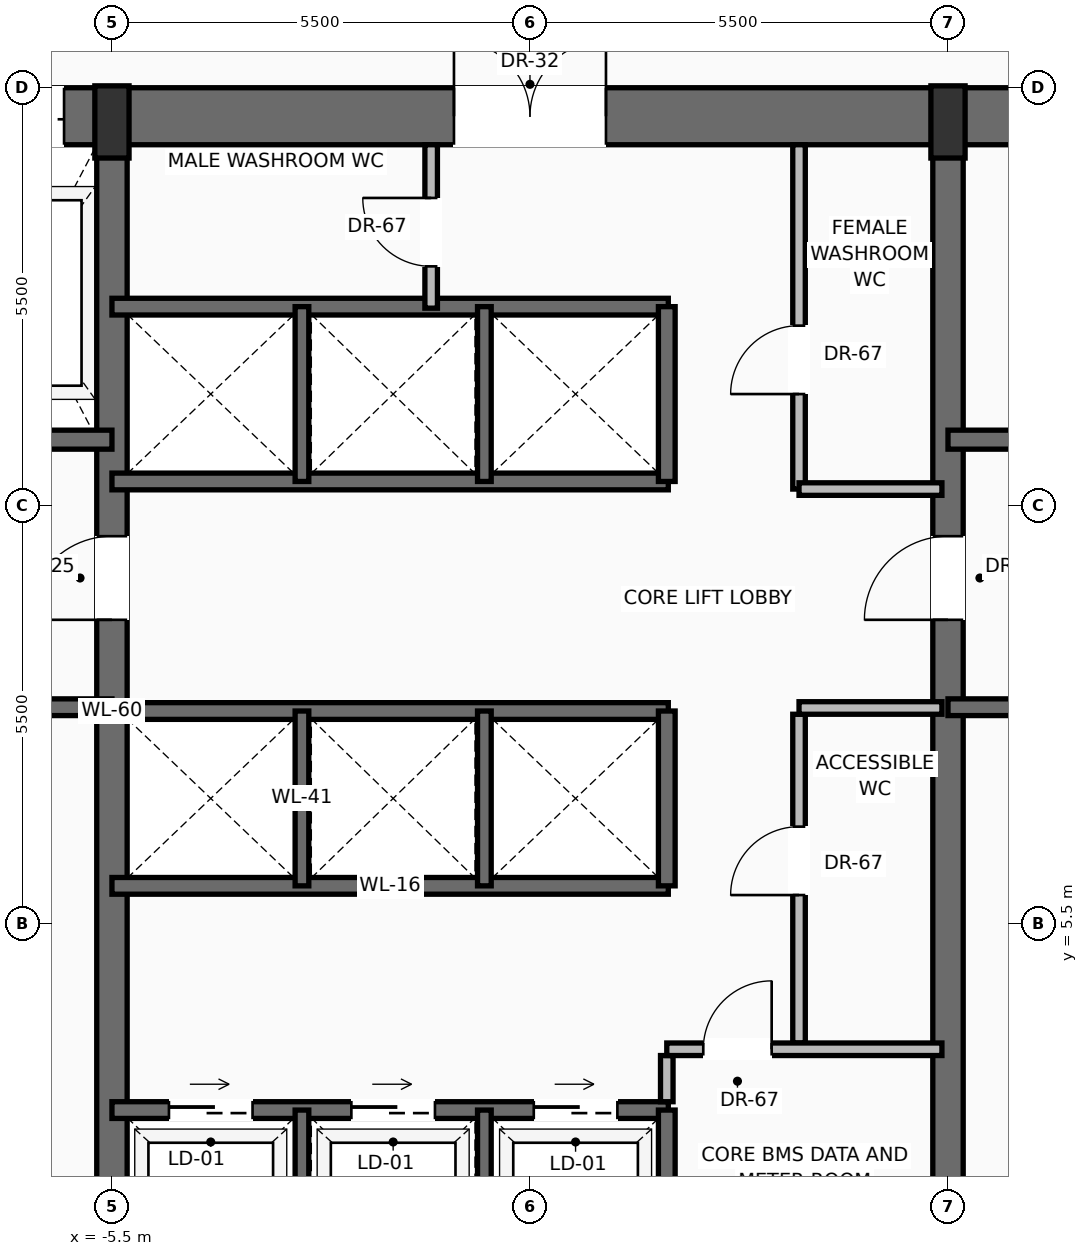
"""IFC4 building model, lengths in metres.
Left out: names, types, materials, properties, quantities, classifications, styles, units other than length and angle.
Written with IfcOpenShell. Run it as: python <this file> out.ifc"""

import sys

from ifc_helpers import new_model, si_unit, direction, frame, frame_2d, origin, origin_2d, place, context, subcontext, project, spatial, rectangle, extrude, source, transform, mapped, element, fill, save


model = new_model("IFC4")
c1 = context("Model", 3, precision=1e-05, world=origin(), true_north=direction((0.0, 1.0)))
c2 = subcontext(c1, "Body", "Model", "MODEL_VIEW")
j1 = project(units=[si_unit("LENGTHUNIT", "METRE"), si_unit("PLANEANGLEUNIT", "RADIAN")], contexts=[c1])
p1 = place(None, origin())
s1 = spatial("IfcSite", under=j1, at=p1, CompositionType="ELEMENT")
p2 = place(p1, origin())
s2 = spatial("IfcBuilding", under=s1, at=p2, CompositionType="ELEMENT")
p3 = place(p2, frame((0.0, 0.0, 117.3)))
s3 = spatial("IfcBuildingStorey", under=s2, at=p3, CompositionType="ELEMENT", Elevation=117.3)
p4 = place(p3, frame((-10.9, 16.125, 0.0), z_axis=(0.0, 0.0, 1.0), x_axis=(1.0, 0.0, 0.0)))
e1 = element("IfcWall", 1, at=p4, inside=s3, PredefinedType="SHEAR", context=c2, shape_type="SweptSolid", body=[
    extrude(rectangle(XDim=21.8, YDim=0.75, at=frame_2d((10.9, 0.0))), origin(), (0.0, 0.0, 1.0), 3.42),
])
p5 = place(p4, frame((3.47, 0.0, 0.0)))
e2 = element("IfcOpeningElement", 2, at=p5, cuts=e1, PredefinedType="OPENING", context=c2, shape_type="SweptSolid", body=[
    extrude(rectangle(XDim=1.3, YDim=2.3, at=frame_2d((0.65, 1.15))), frame((0.0, 0.385, 0.0), z_axis=(0.0, -1.0, 0.0), x_axis=(1.0, 0.0, 0.0)), (0.0, 0.0, 1.0), 0.77),
])
p6 = place(p4, frame((9.9, 0.0, 0.0)))
e3 = element("IfcOpeningElement", 3, at=p6, cuts=e1, PredefinedType="OPENING", context=c2, shape_type="SweptSolid", body=[
    extrude(rectangle(XDim=2.0, YDim=2.4, at=frame_2d((1.0, 1.2))), frame((0.0, 0.385, 0.0), z_axis=(0.0, -1.0, 0.0), x_axis=(1.0, 0.0, 0.0)), (0.0, 0.0, 1.0), 0.77),
])
p7 = place(p3, frame((-5.5, 0.475, 0.0), z_axis=(0.0, 0.0, 1.0), x_axis=(0.0, 1.0, 0.0)))
e4 = element("IfcWall", 4, at=p7, inside=s3, PredefinedType="SHEAR", context=c2, shape_type="SweptSolid", body=[
    extrude(rectangle(XDim=15.65, YDim=0.4, at=frame_2d((7.825, 0.0))), origin(), (0.0, 0.0, 1.0), 3.42),
])
p8 = place(p7, frame((9.025, 0.0, 0.0)))
e5 = element("IfcOpeningElement", 5, at=p8, cuts=e4, PredefinedType="OPENING", context=c2, shape_type="SweptSolid", body=[
    extrude(rectangle(XDim=1.1, YDim=2.2, at=frame_2d((0.55, 1.1))), frame((0.0, 0.21, 0.0), z_axis=(0.0, -1.0, 0.0), x_axis=(1.0, 0.0, 0.0)), (0.0, 0.0, 1.0), 0.42),
])
p9 = place(p3, frame((5.5, 0.475, 0.0), z_axis=(0.0, 0.0, 1.0), x_axis=(0.0, 1.0, 0.0)))
e6 = element("IfcWall", 6, at=p9, inside=s3, PredefinedType="SHEAR", context=c2, shape_type="SweptSolid", body=[
    extrude(rectangle(XDim=15.65, YDim=0.4, at=frame_2d((7.825, 0.0))), origin(), (0.0, 0.0, 1.0), 3.42),
])
p10 = place(p9, frame((9.025, 0.0, 0.0)))
e7 = element("IfcOpeningElement", 7, at=p10, cuts=e6, PredefinedType="OPENING", context=c2, shape_type="SweptSolid", body=[
    extrude(rectangle(XDim=1.1, YDim=2.2, at=frame_2d((0.55, 1.1))), frame((0.0, 0.21, 0.0), z_axis=(0.0, -1.0, 0.0), x_axis=(1.0, 0.0, 0.0)), (0.0, 0.0, 1.0), 0.42),
])
m1 = source(origin(), c2, "Body", "SweptSolid", [
    extrude(rectangle(XDim=0.45, YDim=0.95, at=origin_2d()), origin(), (0.0, 0.0, 1.0), 3.7),
])
for number, where, z_axis, x_axis in (
    (8, (-5.5, 16.05, 0.0), (0.0, 0.0, 1.0), (1.0, 0.0, 0.0)),
    (9, (5.5, 16.05, 0.0), (0.0, 0.0, 1.0), (1.0, 0.0, 0.0)),
):
    element("IfcColumn", number, at=place(p3, frame(where, z_axis=z_axis, x_axis=x_axis)), inside=s3, PredefinedType="PILASTER", context=c2, shape_type="MappedRepresentation", body=[
        mapped(m1, transform((0.0, 0.0, 0.0), scale=1.0)),
    ])
p11 = place(p3, frame((-5.5, 8.35, 0.0), z_axis=(0.0, 0.0, 1.0), x_axis=(-1.0, 0.0, 0.0)))
e10 = element("IfcWall", 10, at=p11, inside=s3, PredefinedType="SOLIDWALL", context=c2, shape_type="SweptSolid", body=[
    extrude(rectangle(XDim=4.65, YDim=0.22, at=frame_2d((2.325, 0.0))), origin(), (0.0, 0.0, 1.0), 3.42),
])
p12 = place(p11, frame((2.5, 0.0, 0.0)))
e11 = element("IfcOpeningElement", 11, at=p12, cuts=e10, PredefinedType="OPENING", context=c2, shape_type="SweptSolid", body=[
    extrude(rectangle(XDim=1.15, YDim=2.2, at=frame_2d((0.575, 1.1))), frame((0.0, 0.12, 0.0), z_axis=(0.0, -1.0, 0.0), x_axis=(1.0, 0.0, 0.0)), (0.0, 0.0, 1.0), 0.24),
])
p13 = place(p3, frame((-5.5, 11.87, 0.0), z_axis=(0.0, 0.0, 1.0), x_axis=(-1.0, 0.0, 0.0)))
e12 = element("IfcWall", 12, at=p13, inside=s3, PredefinedType="SOLIDWALL", context=c2, shape_type="SweptSolid", body=[
    extrude(rectangle(XDim=4.65, YDim=0.25, at=frame_2d((2.325, 0.0))), origin(), (0.0, 0.0, 1.0), 3.42),
])
p14 = place(p13, frame((2.95, 0.0, 0.0)))
e13 = element("IfcOpeningElement", 13, at=p14, cuts=e12, PredefinedType="OPENING", context=c2, shape_type="SweptSolid", body=[
    extrude(rectangle(XDim=1.2, YDim=2.25, at=frame_2d((0.6, 1.125))), frame((0.0, 0.135, 0.0), z_axis=(0.0, -1.0, 0.0), x_axis=(1.0, 0.0, 0.0)), (0.0, 0.0, 1.0), 0.27),
])
p15 = place(p3, frame((10.15, 8.35, 0.0), z_axis=(0.0, 0.0, 1.0), x_axis=(-1.0, 0.0, 0.0)))
e14 = element("IfcWall", 14, at=p15, inside=s3, PredefinedType="SOLIDWALL", context=c2, shape_type="SweptSolid", body=[
    extrude(rectangle(XDim=4.65, YDim=0.22, at=frame_2d((2.325, 0.0))), origin(), (0.0, 0.0, 1.0), 3.42),
])
p16 = place(p15, frame((1.0, 0.0, 0.0)))
e15 = element("IfcOpeningElement", 15, at=p16, cuts=e14, PredefinedType="OPENING", context=c2, shape_type="SweptSolid", body=[
    extrude(rectangle(XDim=1.15, YDim=2.2, at=frame_2d((0.575, 1.1))), frame((0.0, 0.12, 0.0), z_axis=(0.0, -1.0, 0.0), x_axis=(1.0, 0.0, 0.0)), (0.0, 0.0, 1.0), 0.24),
])
p17 = place(p3, frame((10.15, 11.87, 0.0), z_axis=(0.0, 0.0, 1.0), x_axis=(-1.0, 0.0, 0.0)))
e16 = element("IfcWall", 16, at=p17, inside=s3, PredefinedType="SOLIDWALL", context=c2, shape_type="SweptSolid", body=[
    extrude(rectangle(XDim=4.65, YDim=0.25, at=frame_2d((2.325, 0.0))), origin(), (0.0, 0.0, 1.0), 3.42),
])
p18 = place(p17, frame((0.5, 0.0, 0.0)))
e17 = element("IfcOpeningElement", 17, at=p18, cuts=e16, PredefinedType="OPENING", context=c2, shape_type="SweptSolid", body=[
    extrude(rectangle(XDim=1.2, YDim=2.25, at=frame_2d((0.6, 1.125))), frame((0.0, 0.135, 0.0), z_axis=(0.0, -1.0, 0.0), x_axis=(1.0, 0.0, 0.0)), (0.0, 0.0, 1.0), 0.27),
])
p19 = place(p3, frame((-5.5, 3.05, 0.0), z_axis=(0.0, 0.0, 1.0), x_axis=(1.0, 0.0, 0.0)))
e18 = element("IfcWall", 18, at=p19, inside=s3, PredefinedType="SOLIDWALL", context=c2, shape_type="SweptSolid", body=[
    extrude(rectangle(XDim=7.32, YDim=0.22, at=frame_2d((3.66, 0.0))), origin(), (0.0, 0.0, 1.0), 3.42),
])
p20 = place(p19, frame((0.75, 0.0, 0.0)))
e19 = element("IfcOpeningElement", 19, at=p20, cuts=e18, PredefinedType="OPENING", context=c2, shape_type="SweptSolid", body=[
    extrude(rectangle(XDim=1.1, YDim=2.2, at=frame_2d((0.55, 1.1))), frame((0.0, 0.12, 0.0), z_axis=(0.0, -1.0, 0.0), x_axis=(1.0, 0.0, 0.0)), (0.0, 0.0, 1.0), 0.24),
])
p21 = place(p19, frame((3.15, 0.0, 0.0)))
e20 = element("IfcOpeningElement", 20, at=p21, cuts=e18, PredefinedType="OPENING", context=c2, shape_type="SweptSolid", body=[
    extrude(rectangle(XDim=1.1, YDim=2.2, at=frame_2d((0.55, 1.1))), frame((0.0, 0.12, 0.0), z_axis=(0.0, -1.0, 0.0), x_axis=(1.0, 0.0, 0.0)), (0.0, 0.0, 1.0), 0.24),
])
p22 = place(p19, frame((5.55, 0.0, 0.0)))
e21 = element("IfcOpeningElement", 21, at=p22, cuts=e18, PredefinedType="OPENING", context=c2, shape_type="SweptSolid", body=[
    extrude(rectangle(XDim=1.1, YDim=2.2, at=frame_2d((0.55, 1.1))), frame((0.0, 0.12, 0.0), z_axis=(0.0, -1.0, 0.0), x_axis=(1.0, 0.0, 0.0)), (0.0, 0.0, 1.0), 0.24),
])
p23 = place(p3, frame((1.8, 0.85, 0.0), z_axis=(0.0, 0.0, 1.0), x_axis=(0.0, 1.0, 0.0)))
e22 = element("IfcWall", 22, at=p23, inside=s3, PredefinedType="SOLIDWALL", context=c2, shape_type="SweptSolid", body=[
    extrude(rectangle(XDim=2.2, YDim=0.22, at=frame_2d((1.1, 0.0))), origin(), (0.0, 0.0, 1.0), 3.42),
])
for number, where, z_axis, x_axis in (
    (23, (-3.0, 0.85, 0.0), (0.0, 0.0, 1.0), (0.0, 1.0, 0.0)),
    (24, (-0.6, 0.85, 0.0), (0.0, 0.0, 1.0), (0.0, 1.0, 0.0)),
):
    element("IfcWall", number, at=place(p3, frame(where, z_axis=z_axis, x_axis=x_axis)), inside=s3, PredefinedType="SOLIDWALL", context=c2, shape_type="SweptSolid", body=[
        extrude(rectangle(XDim=2.2, YDim=0.18, at=frame_2d((1.1, 0.0))), origin(), (0.0, 0.0, 1.0), 3.42),
    ])
p24 = place(p3, frame((1.8, 3.16, 0.0), z_axis=(0.0, 0.0, 1.0), x_axis=(0.0, 1.0, 0.0)))
e25 = element("IfcWall", 25, at=p24, inside=s3, PredefinedType="PARTITIONING", context=c2, shape_type="SweptSolid", body=[
    extrude(rectangle(XDim=0.608, YDim=0.165, at=frame_2d((0.304, 0.0))), origin(), (0.0, 0.0, 1.0), 3.412),
])
p25 = place(p3, frame((3.54, 3.933, 0.0), z_axis=(0.0, 0.0, 1.0), x_axis=(0.0, 1.0, 0.0)))
e26 = element("IfcWall", 26, at=p25, inside=s3, PredefinedType="PARTITIONING", context=c2, shape_type="SweptSolid", body=[
    extrude(rectangle(XDim=4.325, YDim=0.165, at=frame_2d((2.163, 0.0))), origin(), (0.0, 0.0, 1.0), 3.412),
])
p26 = place(p25, frame((1.946, 0.0, 0.0)))
e27 = element("IfcOpeningElement", 27, at=p26, cuts=e26, PredefinedType="OPENING", context=c2, shape_type="SweptSolid", body=[
    extrude(rectangle(XDim=0.9, YDim=2.1, at=frame_2d((0.45, 1.05))), frame((0.0, 0.093, 0.0), z_axis=(0.0, -1.0, 0.0), x_axis=(1.0, 0.0, 0.0)), (0.0, 0.0, 1.0), 0.185),
])
p27 = place(p3, frame((3.54, 8.34, 0.0), z_axis=(0.0, 0.0, 1.0), x_axis=(1.0, 0.0, 0.0)))
e28 = element("IfcWall", 28, at=p27, inside=s3, PredefinedType="PARTITIONING", context=c2, shape_type="SweptSolid", body=[
    extrude(rectangle(XDim=1.88, YDim=0.165, at=frame_2d((0.94, 0.0))), origin(), (0.0, 0.0, 1.0), 3.412),
])
p28 = place(p3, frame((1.8, 3.85, 0.0), z_axis=(0.0, 0.0, 1.0), x_axis=(1.0, 0.0, 0.0)))
e29 = element("IfcWall", 29, at=p28, inside=s3, PredefinedType="PARTITIONING", context=c2, shape_type="SweptSolid", body=[
    extrude(rectangle(XDim=3.62, YDim=0.165, at=frame_2d((1.81, 0.0))), origin(), (0.0, 0.0, 1.0), 3.412),
])
p29 = place(p28, frame((0.48, 0.0, 0.0)))
e30 = element("IfcOpeningElement", 30, at=p29, cuts=e29, PredefinedType="OPENING", context=c2, shape_type="SweptSolid", body=[
    extrude(rectangle(XDim=0.9, YDim=2.1, at=frame_2d((0.45, 1.05))), frame((0.0, 0.093, 0.0), z_axis=(0.0, -1.0, 0.0), x_axis=(1.0, 0.0, 0.0)), (0.0, 0.0, 1.0), 0.185),
])
for number, where, z_axis, x_axis in (
    (31, (-5.5, 6.0, 0.0), (0.0, 0.0, 1.0), (1.0, 0.0, 0.0)),
    (32, (-5.5, 8.3, 0.0), (0.0, 0.0, 1.0), (1.0, 0.0, 0.0)),
):
    element("IfcWall", number, at=place(p3, frame(where, z_axis=z_axis, x_axis=x_axis)), inside=s3, PredefinedType="SOLIDWALL", context=c2, shape_type="SweptSolid", body=[
        extrude(rectangle(XDim=7.32, YDim=0.22, at=frame_2d((3.66, 0.0))), origin(), (0.0, 0.0, 1.0), 3.42),
    ])
p30 = place(p3, frame((1.8, 6.0, 0.0), z_axis=(0.0, 0.0, 1.0), x_axis=(0.0, 1.0, 0.0)))
e33 = element("IfcWall", 33, at=p30, inside=s3, PredefinedType="SOLIDWALL", context=c2, shape_type="SweptSolid", body=[
    extrude(rectangle(XDim=2.3, YDim=0.22, at=frame_2d((1.15, 0.0))), origin(), (0.0, 0.0, 1.0), 3.42),
])
for number, where, z_axis, x_axis in (
    (34, (-3.0, 6.0, 0.0), (0.0, 0.0, 1.0), (0.0, 1.0, 0.0)),
    (35, (-0.6, 6.0, 0.0), (0.0, 0.0, 1.0), (0.0, 1.0, 0.0)),
):
    element("IfcWall", number, at=place(p3, frame(where, z_axis=z_axis, x_axis=x_axis)), inside=s3, PredefinedType="SOLIDWALL", context=c2, shape_type="SweptSolid", body=[
        extrude(rectangle(XDim=2.3, YDim=0.18, at=frame_2d((1.15, 0.0))), origin(), (0.0, 0.0, 1.0), 3.42),
    ])
for number, where, z_axis, x_axis in (
    (36, (-5.5, 11.32, 0.0), (0.0, 0.0, 1.0), (1.0, 0.0, 0.0)),
    (37, (-5.5, 13.62, 0.0), (0.0, 0.0, 1.0), (1.0, 0.0, 0.0)),
):
    element("IfcWall", number, at=place(p3, frame(where, z_axis=z_axis, x_axis=x_axis)), inside=s3, PredefinedType="SOLIDWALL", context=c2, shape_type="SweptSolid", body=[
        extrude(rectangle(XDim=7.32, YDim=0.22, at=frame_2d((3.66, 0.0))), origin(), (0.0, 0.0, 1.0), 3.42),
    ])
p31 = place(p3, frame((1.8, 11.32, 0.0), z_axis=(0.0, 0.0, 1.0), x_axis=(0.0, 1.0, 0.0)))
e38 = element("IfcWall", 38, at=p31, inside=s3, PredefinedType="SOLIDWALL", context=c2, shape_type="SweptSolid", body=[
    extrude(rectangle(XDim=2.3, YDim=0.22, at=frame_2d((1.15, 0.0))), origin(), (0.0, 0.0, 1.0), 3.42),
])
for number, where, z_axis, x_axis in (
    (39, (-3.0, 11.32, 0.0), (0.0, 0.0, 1.0), (0.0, 1.0, 0.0)),
    (40, (-0.6, 11.32, 0.0), (0.0, 0.0, 1.0), (0.0, 1.0, 0.0)),
):
    element("IfcWall", number, at=place(p3, frame(where, z_axis=z_axis, x_axis=x_axis)), inside=s3, PredefinedType="SOLIDWALL", context=c2, shape_type="SweptSolid", body=[
        extrude(rectangle(XDim=2.3, YDim=0.18, at=frame_2d((1.15, 0.0))), origin(), (0.0, 0.0, 1.0), 3.42),
    ])
p32 = place(p3, frame((-1.3, 13.6, 0.0), z_axis=(0.0, 0.0, 1.0), x_axis=(0.0, 1.0, 0.0)))
e41 = element("IfcWall", 41, at=p32, inside=s3, PredefinedType="PARTITIONING", context=c2, shape_type="SweptSolid", body=[
    extrude(rectangle(XDim=2.15, YDim=0.165, at=frame_2d((1.075, 0.0))), origin(), (0.0, 0.0, 1.0), 3.412),
])
p33 = place(p32, frame((0.55, 0.0, 0.0)))
e42 = element("IfcOpeningElement", 42, at=p33, cuts=e41, PredefinedType="OPENING", context=c2, shape_type="SweptSolid", body=[
    extrude(rectangle(XDim=0.9, YDim=2.1, at=frame_2d((0.45, 1.05))), frame((0.0, 0.093, 0.0), z_axis=(0.0, -1.0, 0.0), x_axis=(1.0, 0.0, 0.0)), (0.0, 0.0, 1.0), 0.185),
])
p34 = place(p3, frame((3.54, 11.22, 0.0), z_axis=(0.0, 0.0, 1.0), x_axis=(0.0, 1.0, 0.0)))
e43 = element("IfcWall", 43, at=p34, inside=s3, PredefinedType="PARTITIONING", context=c2, shape_type="SweptSolid", body=[
    extrude(rectangle(XDim=4.53, YDim=0.165, at=frame_2d((2.265, 0.0))), origin(), (0.0, 0.0, 1.0), 3.412),
])
p35 = place(p34, frame((1.25, 0.0, 0.0)))
e44 = element("IfcOpeningElement", 44, at=p35, cuts=e43, PredefinedType="OPENING", context=c2, shape_type="SweptSolid", body=[
    extrude(rectangle(XDim=0.9, YDim=2.1, at=frame_2d((0.45, 1.05))), frame((0.0, 0.093, 0.0), z_axis=(0.0, -1.0, 0.0), x_axis=(1.0, 0.0, 0.0)), (0.0, 0.0, 1.0), 0.185),
])
p36 = place(p3, frame((3.54, 11.22, 0.0), z_axis=(0.0, 0.0, 1.0), x_axis=(1.0, 0.0, 0.0)))
e45 = element("IfcWall", 45, at=p36, inside=s3, PredefinedType="PARTITIONING", context=c2, shape_type="SweptSolid", body=[
    extrude(rectangle(XDim=1.88, YDim=0.165, at=frame_2d((0.94, 0.0))), origin(), (0.0, 0.0, 1.0), 3.412),
])
m2 = source(origin(), c2, "Body", "SweptSolid", [
    extrude(rectangle(XDim=1.1, YDim=2.2, at=frame_2d((0.55, 1.1))), frame((0.0, 0.025, 0.0), z_axis=(0.0, -1.0, 0.0), x_axis=(1.0, 0.0, 0.0)), (0.0, 0.0, 1.0), 0.05),
])
p37 = place(p8, origin())
e46 = element("IfcDoor", 46, at=p37, inside=s3, OperationType="SINGLE_SWING_LEFT", PredefinedType="DOOR", context=c2, shape_type="MappedRepresentation", body=[
    mapped(m2, transform((0.0, 0.0, 0.0), scale=1.0)),
])
fill(e5, e46)
m3 = source(origin(), c2, "Body", "SweptSolid", [
    extrude(rectangle(XDim=1.3, YDim=2.3, at=frame_2d((0.65, 1.15))), frame((0.0, 0.025, 0.0), z_axis=(0.0, -1.0, 0.0), x_axis=(1.0, 0.0, 0.0)), (0.0, 0.0, 1.0), 0.05),
])
p38 = place(p5, origin())
e47 = element("IfcDoor", 47, at=p38, inside=s3, OperationType="SLIDING_TO_RIGHT", PredefinedType="DOOR", context=c2, shape_type="MappedRepresentation", body=[
    mapped(m3, transform((0.0, 0.0, 0.0), scale=1.0)),
])
fill(e2, e47)
p39 = place(p10, origin())
e48 = element("IfcDoor", 48, at=p39, inside=s3, OperationType="SINGLE_SWING_LEFT", PredefinedType="DOOR", context=c2, shape_type="MappedRepresentation", body=[
    mapped(m2, transform((0.0, 0.0, 0.0), scale=1.0)),
])
fill(e7, e48)
m4 = source(origin(), c2, "Body", "SweptSolid", [
    extrude(rectangle(XDim=2.0, YDim=2.4, at=frame_2d((1.0, 1.2))), frame((0.0, 0.025, 0.0), z_axis=(0.0, -1.0, 0.0), x_axis=(1.0, 0.0, 0.0)), (0.0, 0.0, 1.0), 0.05),
])
p40 = place(p6, origin())
e49 = element("IfcDoor", 49, at=p40, inside=s3, OperationType="DOUBLE_DOOR_SINGLE_SWING", PredefinedType="DOOR", context=c2, shape_type="MappedRepresentation", body=[
    mapped(m4, transform((0.0, 0.0, 0.0), scale=1.0)),
])
fill(e3, e49)
m5 = source(origin(), c2, "Body", "SweptSolid", [
    extrude(rectangle(XDim=1.1, YDim=2.2, at=frame_2d((0.55, 1.1))), frame((0.0, 0.025, 0.0), z_axis=(0.0, -1.0, 0.0), x_axis=(1.0, 0.0, 0.0)), (0.0, 0.0, 1.0), 0.05),
])
p41 = place(p20, origin())
e50 = element("IfcDoor", 50, at=p41, inside=s3, OperationType="SLIDING_TO_RIGHT", PredefinedType="DOOR", context=c2, shape_type="MappedRepresentation", body=[
    mapped(m5, transform((0.0, 0.0, 0.0), scale=1.0)),
])
fill(e19, e50)
p42 = place(p21, origin())
e51 = element("IfcDoor", 51, at=p42, inside=s3, OperationType="SLIDING_TO_RIGHT", PredefinedType="DOOR", context=c2, shape_type="MappedRepresentation", body=[
    mapped(m5, transform((0.0, 0.0, 0.0), scale=1.0)),
])
fill(e20, e51)
p43 = place(p22, origin())
e52 = element("IfcDoor", 52, at=p43, inside=s3, OperationType="SLIDING_TO_RIGHT", PredefinedType="DOOR", context=c2, shape_type="MappedRepresentation", body=[
    mapped(m5, transform((0.0, 0.0, 0.0), scale=1.0)),
])
fill(e21, e52)
m6 = source(origin(), c2, "Body", "SweptSolid", [
    extrude(rectangle(XDim=0.9, YDim=2.1, at=frame_2d((0.45, 1.05))), frame((0.0, 0.025, 0.0), z_axis=(0.0, -1.0, 0.0), x_axis=(1.0, 0.0, 0.0)), (0.0, 0.0, 1.0), 0.05),
])
p44 = place(p29, origin())
e53 = element("IfcDoor", 53, at=p44, inside=s3, OperationType="SINGLE_SWING_RIGHT", PredefinedType="DOOR", context=c2, shape_type="MappedRepresentation", body=[
    mapped(m6, transform((0.0, 0.0, 0.0), scale=1.0)),
])
fill(e30, e53)
p45 = place(p26, origin())
e54 = element("IfcDoor", 54, at=p45, inside=s3, OperationType="SINGLE_SWING_LEFT", PredefinedType="DOOR", context=c2, shape_type="MappedRepresentation", body=[
    mapped(m6, transform((0.0, 0.0, 0.0), scale=1.0)),
])
fill(e27, e54)
p46 = place(p33, origin())
e55 = element("IfcDoor", 55, at=p46, inside=s3, OperationType="SINGLE_SWING_RIGHT", PredefinedType="DOOR", context=c2, shape_type="MappedRepresentation", body=[
    mapped(m6, transform((0.0, 0.0, 0.0), scale=1.0)),
])
fill(e42, e55)
p47 = place(p35, origin())
e56 = element("IfcDoor", 56, at=p47, inside=s3, OperationType="SINGLE_SWING_LEFT", PredefinedType="DOOR", context=c2, shape_type="MappedRepresentation", body=[
    mapped(m6, transform((0.0, 0.0, 0.0), scale=1.0)),
])
fill(e44, e56)
save(model, sys.argv[1])
